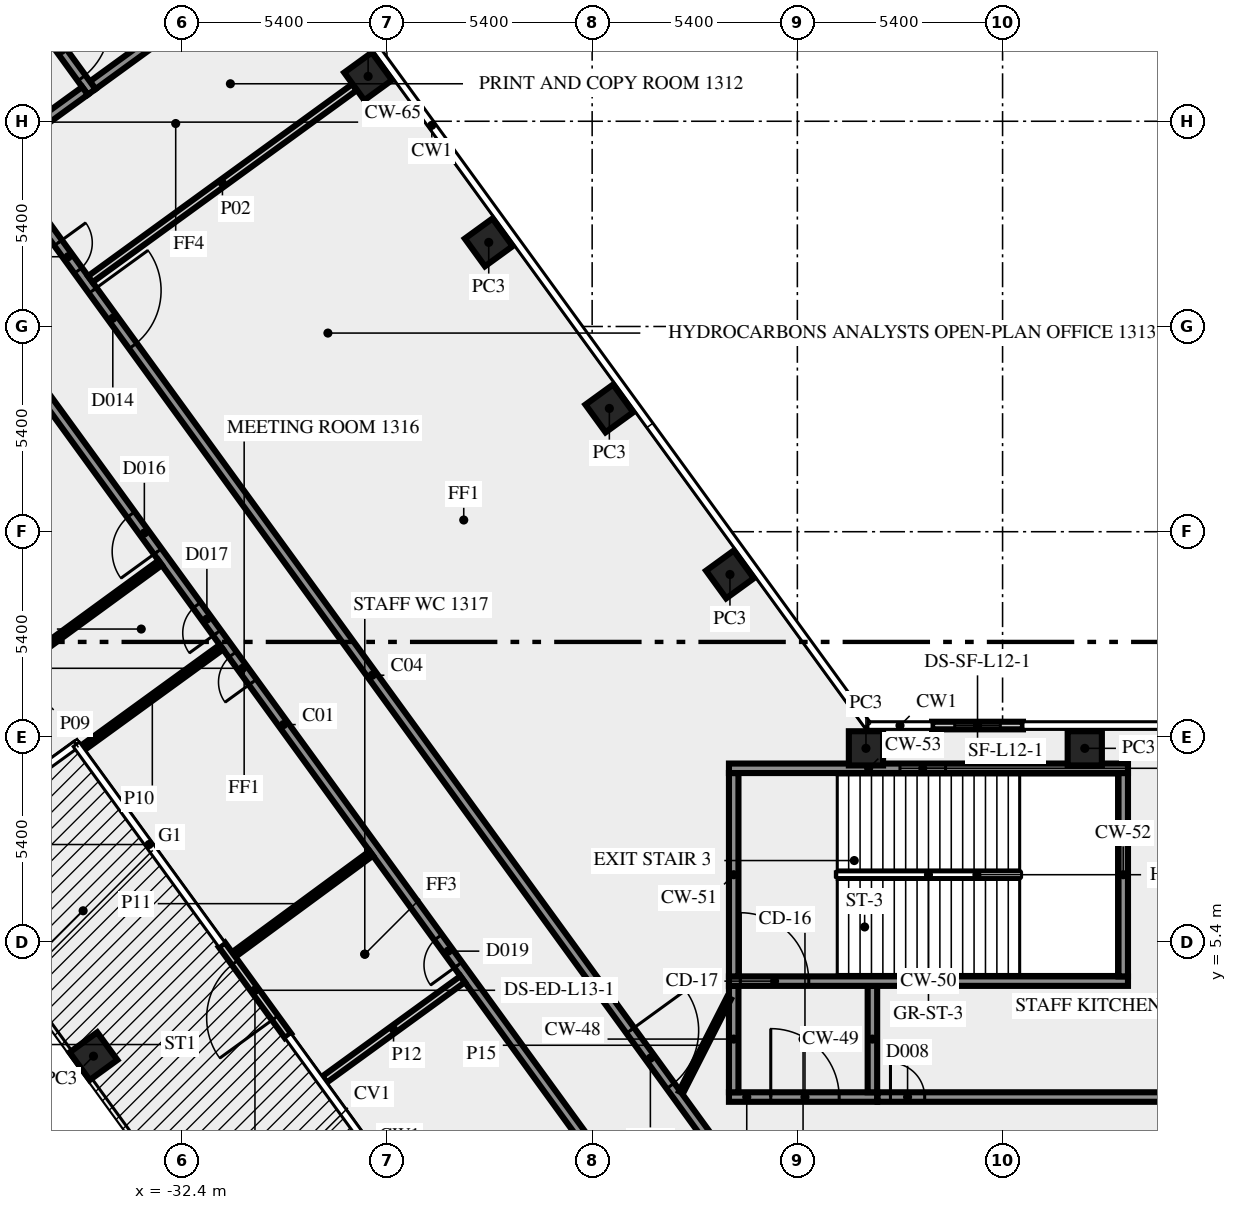
"""IFC4 building model, lengths in metres.
Left out: names, types, materials, properties, quantities, classifications, styles, units other than length and angle.
Written with IfcOpenShell. Run it as: python <this file> out.ifc"""

import sys

from ifc_helpers import new_model, si_unit, direction, frame, frame_2d, origin, origin_2d, place, context, subcontext, project, spatial, rectangle, extrude, element, fill, save


model = new_model("IFC4")
c1 = context("Model", 3, precision=1e-05, world=origin(), true_north=direction((0.0, 1.0)))
c2 = subcontext(c1, "Body", "Model", "MODEL_VIEW")
j1 = project(units=[si_unit("LENGTHUNIT", "METRE"), si_unit("PLANEANGLEUNIT", "RADIAN")], contexts=[c1])
p1 = place(None, origin())
s1 = spatial("IfcSite", under=j1, at=p1, CompositionType="ELEMENT")
p2 = place(p1, origin())
s2 = spatial("IfcBuilding", under=s1, at=p2, CompositionType="ELEMENT")
p3 = place(p2, frame((0.0, 0.0, 59.0)))
s3 = spatial("IfcBuildingStorey", under=s2, at=p3, CompositionType="ELEMENT", Elevation=59.0)
for number, where, z_axis, x_axis in (
    (1, (-17.974, 15.075, 0.0), (0.0, 0.0, 1.0), (-0.588, 0.809, 0.0)),
    (2, (-21.147, 19.444, 0.0), (0.0, 0.0, 1.0), (-0.588, 0.809, 0.0)),
    (3, (-24.321, 23.812, 0.0), (0.0, 0.0, 1.0), (-0.588, 0.809, 0.0)),
    (4, (-27.495, 28.181, 0.0), (0.0, 0.0, 1.0), (-0.588, 0.809, 0.0)),
    (5, (-34.722, 2.4, 0.0), (0.0, 0.0, 1.0), (0.588, -0.809, 0.0)),
    (6, (-8.637, 10.5, 0.0), (0.0, 0.0, 1.0), (-1.0, 0.0, 0.0)),
    (7, (-14.395, 10.5, 0.0), (0.0, 0.0, 1.0), (-1.0, 0.0, 0.0)),
):
    element("IfcColumn", number, at=place(p3, frame(where, z_axis=z_axis, x_axis=x_axis)), inside=s3, PredefinedType="COLUMN", context=c2, shape_type="SweptSolid", body=[
        extrude(rectangle(XDim=0.9, YDim=0.9, at=origin_2d()), origin(), (0.0, 0.0, 1.0), 3.65),
    ])
p4 = place(p3, frame((-29.602, 2.936, 0.0), z_axis=(0.0, 0.0, 1.0), x_axis=(-0.587735577821, 0.809053082661, 0.0)))
e8 = element("IfcWall", 8, at=p4, inside=s3, PredefinedType="SOLIDWALL", context=c2, shape_type="SweptSolid", body=[
    extrude(rectangle(XDim=2.963, YDim=0.2, at=frame_2d((1.481, 0.0))), origin(), (0.0, 0.0, 1.0), 3.65),
])
p5 = place(p4, frame((0.582, 0.0, 0.0)))
e9 = element("IfcOpeningElement", 9, at=p5, cuts=e8, PredefinedType="OPENING", context=c2, shape_type="SweptSolid", body=[
    extrude(rectangle(XDim=1.8, YDim=2.4, at=frame_2d((0.9, 1.2))), frame((0.0, 0.11, 0.0), z_axis=(0.0, -1.0, 0.0), x_axis=(1.0, 0.0, 0.0)), (0.0, 0.0, 1.0), 0.22),
])
p6 = place(p3, frame((-10.263, 11.1, 0.0), z_axis=(0.0, 0.0, 1.0), x_axis=(-1.0, 0.0, 0.0)))
e10 = element("IfcWall", 10, at=p6, inside=s3, PredefinedType="SOLIDWALL", context=c2, shape_type="SweptSolid", body=[
    extrude(rectangle(XDim=2.392, YDim=0.2, at=frame_2d((1.196, 0.0))), origin(), (0.0, 0.0, 1.0), 3.65),
])
p7 = place(p6, frame((0.596, 0.0, 1.0)))
e11 = element("IfcOpeningElement", 11, at=p7, cuts=e10, PredefinedType="OPENING", context=c2, shape_type="SweptSolid", body=[
    extrude(rectangle(XDim=1.2, YDim=1.2, at=frame_2d((0.6, 0.6))), frame((0.0, 0.11, 0.0), z_axis=(0.0, -1.0, 0.0), x_axis=(1.0, 0.0, 0.0)), (0.0, 0.0, 1.0), 0.22),
])
p8 = place(p3, frame((-18.0, 1.325, 0.0), z_axis=(0.0, 0.0, 1.0), x_axis=(1.0, 0.0, 0.0)))
e12 = element("IfcWall", 12, at=p8, inside=s3, PredefinedType="SHEAR", context=c2, shape_type="SweptSolid", body=[
    extrude(rectangle(XDim=3.9, YDim=0.25, at=frame_2d((1.95, 0.0))), origin(), (0.0, 0.0, 1.0), 3.65),
])
p9 = place(p8, frame((1.1, 0.0, 0.0)))
e13 = element("IfcOpeningElement", 13, at=p9, cuts=e12, PredefinedType="OPENING", context=c2, shape_type="SweptSolid", body=[
    extrude(rectangle(XDim=1.8, YDim=2.1, at=frame_2d((0.9, 1.05))), frame((0.0, 0.135, 0.0), z_axis=(0.0, -1.0, 0.0), x_axis=(1.0, 0.0, 0.0)), (0.0, 0.0, 1.0), 0.27),
])
for number, where, z_axis, x_axis in (
    (14, (-17.875, 1.45, 0.0), (0.0, 0.0, 1.0), (0.0, 1.0, 0.0)),
    (15, (-14.225, 1.45, 0.0), (0.0, 0.0, 1.0), (0.0, 1.0, 0.0)),
):
    element("IfcWall", number, at=place(p3, frame(where, z_axis=z_axis, x_axis=x_axis)), inside=s3, PredefinedType="SHEAR", context=c2, shape_type="SweptSolid", body=[
        extrude(rectangle(XDim=2.8, YDim=0.25, at=frame_2d((1.4, 0.0))), origin(), (0.0, 0.0, 1.0), 3.65),
    ])
p10 = place(p3, frame((-18.0, 4.375, 0.0), z_axis=(0.0, 0.0, 1.0), x_axis=(1.0, 0.0, 0.0)))
e16 = element("IfcWall", 16, at=p10, inside=s3, PredefinedType="SHEAR", context=c2, shape_type="SweptSolid", body=[
    extrude(rectangle(XDim=10.5, YDim=0.25, at=frame_2d((5.25, 0.0))), origin(), (0.0, 0.0, 1.0), 3.65),
])
p11 = place(p10, frame((0.3, 0.0, 0.0)))
e17 = element("IfcOpeningElement", 17, at=p11, cuts=e16, PredefinedType="OPENING", context=c2, shape_type="SweptSolid", body=[
    extrude(rectangle(XDim=1.8, YDim=2.1, at=frame_2d((0.9, 1.05))), frame((0.0, 0.135, 0.0), z_axis=(0.0, -1.0, 0.0), x_axis=(1.0, 0.0, 0.0)), (0.0, 0.0, 1.0), 0.27),
])
for number, where, z_axis, x_axis in (
    (18, (-17.875, 4.5, 0.0), (0.0, 0.0, 1.0), (0.0, 1.0, 0.0)),
    (19, (-7.625, 4.5, 0.0), (0.0, 0.0, 1.0), (0.0, 1.0, 0.0)),
):
    element("IfcWall", number, at=place(p3, frame(where, z_axis=z_axis, x_axis=x_axis)), inside=s3, PredefinedType="SHEAR", context=c2, shape_type="SweptSolid", body=[
        extrude(rectangle(XDim=5.35, YDim=0.25, at=frame_2d((2.675, 0.0))), origin(), (0.0, 0.0, 1.0), 3.65),
    ])
p12 = place(p3, frame((-18.0, 9.975, 0.0), z_axis=(0.0, 0.0, 1.0), x_axis=(1.0, 0.0, 0.0)))
e20 = element("IfcWall", 20, at=p12, inside=s3, PredefinedType="SHEAR", context=c2, shape_type="SweptSolid", body=[
    extrude(rectangle(XDim=10.5, YDim=0.25, at=frame_2d((5.25, 0.0))), origin(), (0.0, 0.0, 1.0), 3.65),
])
p13 = place(p12, frame((4.5, 0.0, 1.0)))
e21 = element("IfcOpeningElement", 21, at=p13, cuts=e20, PredefinedType="OPENING", context=c2, shape_type="SweptSolid", body=[
    extrude(rectangle(XDim=1.2, YDim=1.2, at=frame_2d((0.6, 0.6))), frame((0.0, 0.135, 0.0), z_axis=(0.0, -1.0, 0.0), x_axis=(1.0, 0.0, 0.0)), (0.0, 0.0, 1.0), 0.27),
])
p14 = place(p3, frame((-30.414, 31.092, 0.0), z_axis=(0.0, 0.0, 1.0), x_axis=(-0.8089984606, -0.587810760999, 0.0)))
e22 = element("IfcWall", 22, at=p14, inside=s3, PredefinedType="SHEAR", context=c2, shape_type="SweptSolid", body=[
    extrude(rectangle(XDim=5.35, YDim=0.25, at=frame_2d((2.675, 0.0))), origin(), (0.0, 0.0, 1.0), 3.65),
])
p15 = place(p3, frame((-40.942, 36.267, 0.0), z_axis=(0.0, 0.0, 1.0), x_axis=(0.587795589702, -0.809009483706, 0.0)))
e23 = element("IfcWall", 23, at=p15, inside=s3, PredefinedType="SHEAR", context=c2, shape_type="SweptSolid", body=[
    extrude(rectangle(XDim=10.5, YDim=0.25, at=frame_2d((5.25, 0.0))), origin(), (0.0, 0.0, 1.0), 3.65),
])
p16 = place(p15, frame((8.25, 0.0, 0.0)))
e24 = element("IfcOpeningElement", 24, at=p16, cuts=e23, PredefinedType="OPENING", context=c2, shape_type="SweptSolid", body=[
    extrude(rectangle(XDim=1.8, YDim=2.1, at=frame_2d((0.9, 1.05))), frame((0.0, 0.135, 0.0), z_axis=(0.0, -1.0, 0.0), x_axis=(1.0, 0.0, 0.0)), (0.0, 0.0, 1.0), 0.27),
])
p17 = place(p3, frame((-34.945, 27.8, 0.0), z_axis=(0.0, 0.0, 1.0), x_axis=(-0.809041377956, -0.587751689708, 0.0)))
e25 = element("IfcWall", 25, at=p17, inside=s3, PredefinedType="SHEAR", context=c2, shape_type="SweptSolid", body=[
    extrude(rectangle(XDim=2.8, YDim=0.25, at=frame_2d((1.4, 0.0))), origin(), (0.0, 0.0, 1.0), 3.65),
])
p18 = place(p3, frame((-20.531, -1.523, 0.0), z_axis=(0.0, 0.0, 1.0), x_axis=(-0.587784593204, 0.809017473231, 0.0)))
e26 = element("IfcWall", 26, at=p18, inside=s3, PredefinedType="SOLIDWALL", context=c2, shape_type="SweptSolid", body=[
    extrude(rectangle(XDim=44.67, YDim=0.25, at=frame_2d((22.335, 0.0))), origin(), (0.0, 0.0, 1.0), 3.65),
])
p19 = place(p18, frame((43.046, 0.0, 0.0)))
e27 = element("IfcOpeningElement", 27, at=p19, cuts=e26, PredefinedType="OPENING", context=c2, shape_type="SweptSolid", body=[
    extrude(rectangle(XDim=1.2, YDim=2.1, at=frame_2d((0.6, 1.05))), frame((0.0, 0.135, 0.0), z_axis=(0.0, -1.0, 0.0), x_axis=(1.0, 0.0, 0.0)), (0.0, 0.0, 1.0), 0.27),
])
p20 = place(p18, frame((21.266, 0.0, 0.0)))
e28 = element("IfcOpeningElement", 28, at=p20, cuts=e26, PredefinedType="OPENING", context=c2, shape_type="SweptSolid", body=[
    extrude(rectangle(XDim=1.2, YDim=2.1, at=frame_2d((0.6, 1.05))), frame((0.0, 0.135, 0.0), z_axis=(0.0, -1.0, 0.0), x_axis=(1.0, 0.0, 0.0)), (0.0, 0.0, 1.0), 0.27),
])
p21 = place(p18, frame((17.015, 0.0, 0.0)))
e29 = element("IfcOpeningElement", 29, at=p21, cuts=e26, PredefinedType="OPENING", context=c2, shape_type="SweptSolid", body=[
    extrude(rectangle(XDim=0.9, YDim=2.1, at=frame_2d((0.45, 1.05))), frame((0.0, 0.135, 0.0), z_axis=(0.0, -1.0, 0.0), x_axis=(1.0, 0.0, 0.0)), (0.0, 0.0, 1.0), 0.27),
])
p22 = place(p18, frame((0.533, 0.0, 0.0)))
e30 = element("IfcOpeningElement", 30, at=p22, cuts=e26, PredefinedType="OPENING", context=c2, shape_type="SweptSolid", body=[
    extrude(rectangle(XDim=0.9, YDim=2.1, at=frame_2d((0.45, 1.05))), frame((0.0, 0.135, 0.0), z_axis=(0.0, -1.0, 0.0), x_axis=(1.0, 0.0, 0.0)), (0.0, 0.0, 1.0), 0.27),
])
p23 = place(p18, frame((18.616, 0.0, 0.0)))
e31 = element("IfcOpeningElement", 31, at=p23, cuts=e26, PredefinedType="OPENING", context=c2, shape_type="SweptSolid", body=[
    extrude(rectangle(XDim=0.9, YDim=2.1, at=frame_2d((0.45, 1.05))), frame((0.0, 0.135, 0.0), z_axis=(0.0, -1.0, 0.0), x_axis=(1.0, 0.0, 0.0)), (0.0, 0.0, 1.0), 0.27),
])
p24 = place(p18, frame((7.816, 0.0, 0.0)))
e32 = element("IfcOpeningElement", 32, at=p24, cuts=e26, PredefinedType="OPENING", context=c2, shape_type="SweptSolid", body=[
    extrude(rectangle(XDim=0.9, YDim=2.1, at=frame_2d((0.45, 1.05))), frame((0.0, 0.135, 0.0), z_axis=(0.0, -1.0, 0.0), x_axis=(1.0, 0.0, 0.0)), (0.0, 0.0, 1.0), 0.27),
])
p25 = place(p3, frame((-37.232, 25.972, 0.0), z_axis=(0.0, 0.0, 1.0), x_axis=(0.587786323093, -0.809016216391, 0.0)))
e33 = element("IfcWall", 33, at=p25, inside=s3, PredefinedType="SOLIDWALL", context=c2, shape_type="SweptSolid", body=[
    extrude(rectangle(XDim=33.493, YDim=0.25, at=frame_2d((16.747, 0.0))), origin(), (0.0, 0.0, 1.0), 3.65),
])
p26 = place(p25, frame((28.301, 0.0, 0.0)))
e34 = element("IfcOpeningElement", 34, at=p26, cuts=e33, PredefinedType="OPENING", context=c2, shape_type="SweptSolid", body=[
    extrude(rectangle(XDim=1.8, YDim=2.1, at=frame_2d((0.9, 1.05))), frame((0.0, 0.135, 0.0), z_axis=(0.0, -1.0, 0.0), x_axis=(1.0, 0.0, 0.0)), (0.0, 0.0, 1.0), 0.27),
])
p27 = place(p25, frame((4.235, 0.0, 0.0)))
e35 = element("IfcOpeningElement", 35, at=p27, cuts=e33, PredefinedType="OPENING", context=c2, shape_type="SweptSolid", body=[
    extrude(rectangle(XDim=1.8, YDim=2.1, at=frame_2d((0.9, 1.05))), frame((0.0, 0.135, 0.0), z_axis=(0.0, -1.0, 0.0), x_axis=(1.0, 0.0, 0.0)), (0.0, 0.0, 1.0), 0.27),
])
p28 = place(p25, frame((2.685, 0.0, 0.0)))
e36 = element("IfcOpeningElement", 36, at=p28, cuts=e33, PredefinedType="OPENING", context=c2, shape_type="SweptSolid", body=[
    extrude(rectangle(XDim=0.9, YDim=2.1, at=frame_2d((0.45, 1.05))), frame((0.0, 0.135, 0.0), z_axis=(0.0, -1.0, 0.0), x_axis=(1.0, 0.0, 0.0)), (0.0, 0.0, 1.0), 0.27),
])
p29 = place(p3, frame((-14.09, 1.325, 0.0), z_axis=(0.0, 0.0, 1.0), x_axis=(1.0, 0.0, 0.0)))
e37 = element("IfcWall", 37, at=p29, inside=s3, PredefinedType="SOLIDWALL", context=c2, shape_type="SweptSolid", body=[
    extrude(rectangle(XDim=28.18, YDim=0.25, at=frame_2d((14.09, 0.0))), origin(), (0.0, 0.0, 1.0), 3.65),
])
p30 = place(p29, frame((26.94, 0.0, 0.0)))
e38 = element("IfcOpeningElement", 38, at=p30, cuts=e37, PredefinedType="OPENING", context=c2, shape_type="SweptSolid", body=[
    extrude(rectangle(XDim=0.9, YDim=2.1, at=frame_2d((0.45, 1.05))), frame((0.0, 0.135, 0.0), z_axis=(0.0, -1.0, 0.0), x_axis=(1.0, 0.0, 0.0)), (0.0, 0.0, 1.0), 0.27),
])
p31 = place(p29, frame((0.34, 0.0, 0.0)))
e39 = element("IfcOpeningElement", 39, at=p31, cuts=e37, PredefinedType="OPENING", context=c2, shape_type="SweptSolid", body=[
    extrude(rectangle(XDim=0.9, YDim=2.1, at=frame_2d((0.45, 1.05))), frame((0.0, 0.135, 0.0), z_axis=(0.0, -1.0, 0.0), x_axis=(1.0, 0.0, 0.0)), (0.0, 0.0, 1.0), 0.27),
])
p32 = place(p29, frame((14.44, 0.0, 0.0)))
e40 = element("IfcOpeningElement", 40, at=p32, cuts=e37, PredefinedType="OPENING", context=c2, shape_type="SweptSolid", body=[
    extrude(rectangle(XDim=0.9, YDim=2.1, at=frame_2d((0.45, 1.05))), frame((0.0, 0.135, 0.0), z_axis=(0.0, -1.0, 0.0), x_axis=(1.0, 0.0, 0.0)), (0.0, 0.0, 1.0), 0.27),
])
p33 = place(p3, frame((-27.851, 27.897, 0.0), z_axis=(0.0, 0.0, 1.0), x_axis=(-0.809030728677, -0.587766348183, 0.0)))
e41 = element("IfcWall", 41, at=p33, inside=s3, PredefinedType="SOLIDWALL", context=c2, shape_type="SweptSolid", body=[
    extrude(rectangle(XDim=8.596, YDim=0.2, at=frame_2d((4.298, 0.0))), origin(), (0.0, 0.0, 1.0), 3.65),
])
p34 = place(p3, frame((-40.68, 9.75, 0.0), z_axis=(0.0, 0.0, 1.0), x_axis=(0.807645841498, 0.589667868135, 0.0)))
e42 = element("IfcWall", 42, at=p34, inside=s3, PredefinedType="PARTITIONING", context=c2, shape_type="SweptSolid", body=[
    extrude(rectangle(XDim=9.551, YDim=0.15, at=frame_2d((4.775, 0.0))), origin(), (0.0, 0.0, 1.0), 2.75),
])
p35 = place(p3, frame((-31.356, 13.164, 0.0), z_axis=(0.0, 0.0, 1.0), x_axis=(-0.80905553785, -0.587732198092, 0.0)))
e43 = element("IfcWall", 43, at=p35, inside=s3, PredefinedType="PARTITIONING", context=c2, shape_type="SweptSolid", body=[
    extrude(rectangle(XDim=4.493, YDim=0.15, at=frame_2d((2.247, 0.0))), origin(), (0.0, 0.0, 1.0), 3.65),
])
p36 = place(p3, frame((-31.008, 5.091, 0.0), z_axis=(0.0, 0.0, 1.0), x_axis=(0.805604164151, 0.592454159157, 0.0)))
e44 = element("IfcWall", 44, at=p36, inside=s3, PredefinedType="PARTITIONING", context=c2, shape_type="SweptSolid", body=[
    extrude(rectangle(XDim=4.462, YDim=0.15, at=frame_2d((2.231, 0.0))), origin(), (0.0, 0.0, 1.0), 3.65),
])
p37 = place(p3, frame((-25.008, 4.427, 0.0), z_axis=(0.0, 0.0, 1.0), x_axis=(-0.809074306937, -0.58770636023, 0.0)))
e45 = element("IfcWall", 45, at=p37, inside=s3, PredefinedType="SOLIDWALL", context=c2, shape_type="SweptSolid", body=[
    extrude(rectangle(XDim=4.493, YDim=0.2, at=frame_2d((2.247, 0.0))), origin(), (0.0, 0.0, 1.0), 3.65),
])
p38 = place(p3, frame((-19.261, 1.45, 0.0), z_axis=(0.0, 0.0, 1.0), x_axis=(0.453950796792, 0.891026752736, 0.0)))
e46 = element("IfcWall", 46, at=p38, inside=s3, PredefinedType="PARTITIONING", context=c2, shape_type="SweptSolid", body=[
    extrude(rectangle(XDim=2.778, YDim=0.12, at=frame_2d((1.389, 0.0))), origin(), (0.0, 0.0, 1.0), 3.65),
])
p39 = place(p5, origin())
e47 = element("IfcDoor", 47, at=p39, inside=s3, OperationType="DOUBLE_DOOR_SINGLE_SWING", PredefinedType="DOOR", context=c2, shape_type="SweptSolid", body=[
    extrude(rectangle(XDim=1.8, YDim=2.4, at=frame_2d((0.9, 1.2))), frame((0.0, 0.025, 0.0), z_axis=(0.0, -1.0, 0.0), x_axis=(1.0, 0.0, 0.0)), (0.0, 0.0, 1.0), 0.05),
])
fill(e9, e47)
p40 = place(p7, origin())
e48 = element("IfcWindow", 48, at=p40, inside=s3, PartitioningType="SINGLE_PANEL", PredefinedType="WINDOW", context=c2, shape_type="SweptSolid", body=[
    extrude(rectangle(XDim=1.2, YDim=1.2, at=frame_2d((0.6, 0.6))), frame((0.0, 0.03, 0.0), z_axis=(0.0, -1.0, 0.0), x_axis=(1.0, 0.0, 0.0)), (0.0, 0.0, 1.0), 0.06),
])
fill(e11, e48)
p41 = place(p9, origin())
e49 = element("IfcDoor", 49, at=p41, inside=s3, OperationType="DOUBLE_DOOR_SINGLE_SWING", PredefinedType="DOOR", context=c2, shape_type="SweptSolid", body=[
    extrude(rectangle(XDim=1.8, YDim=2.1, at=frame_2d((0.9, 1.05))), frame((0.0, 0.025, 0.0), z_axis=(0.0, -1.0, 0.0), x_axis=(1.0, 0.0, 0.0)), (0.0, 0.0, 1.0), 0.05),
])
fill(e13, e49)
p42 = place(p11, origin())
e50 = element("IfcDoor", 50, at=p42, inside=s3, OperationType="DOUBLE_DOOR_SINGLE_SWING", PredefinedType="DOOR", context=c2, shape_type="SweptSolid", body=[
    extrude(rectangle(XDim=1.8, YDim=2.1, at=frame_2d((0.9, 1.05))), frame((0.0, 0.025, 0.0), z_axis=(0.0, -1.0, 0.0), x_axis=(1.0, 0.0, 0.0)), (0.0, 0.0, 1.0), 0.05),
])
fill(e17, e50)
p43 = place(p13, origin())
e51 = element("IfcWindow", 51, at=p43, inside=s3, PartitioningType="SINGLE_PANEL", PredefinedType="WINDOW", context=c2, shape_type="SweptSolid", body=[
    extrude(rectangle(XDim=1.2, YDim=1.2, at=frame_2d((0.6, 0.6))), frame((0.0, 0.03, 0.0), z_axis=(0.0, -1.0, 0.0), x_axis=(1.0, 0.0, 0.0)), (0.0, 0.0, 1.0), 0.06),
])
fill(e21, e51)
p44 = place(p16, origin())
e52 = element("IfcDoor", 52, at=p44, inside=s3, OperationType="DOUBLE_DOOR_SINGLE_SWING", PredefinedType="DOOR", context=c2, shape_type="SweptSolid", body=[
    extrude(rectangle(XDim=1.8, YDim=2.1, at=frame_2d((0.9, 1.05))), frame((0.0, 0.025, 0.0), z_axis=(0.0, -1.0, 0.0), x_axis=(1.0, 0.0, 0.0)), (0.0, 0.0, 1.0), 0.05),
])
fill(e24, e52)
p45 = place(p26, origin())
e53 = element("IfcDoor", 53, at=p45, inside=s3, OperationType="DOUBLE_DOOR_SINGLE_SWING", PredefinedType="DOOR", context=c2, shape_type="SweptSolid", body=[
    extrude(rectangle(XDim=1.8, YDim=2.1, at=frame_2d((0.9, 1.05))), frame((0.0, 0.025, 0.0), z_axis=(0.0, -1.0, 0.0), x_axis=(1.0, 0.0, 0.0)), (0.0, 0.0, 1.0), 0.05),
])
fill(e34, e53)
p46 = place(p27, origin())
e54 = element("IfcDoor", 54, at=p46, inside=s3, OperationType="DOUBLE_DOOR_SINGLE_SWING", PredefinedType="DOOR", context=c2, shape_type="SweptSolid", body=[
    extrude(rectangle(XDim=1.8, YDim=2.1, at=frame_2d((0.9, 1.05))), frame((0.0, 0.025, 0.0), z_axis=(0.0, -1.0, 0.0), x_axis=(1.0, 0.0, 0.0)), (0.0, 0.0, 1.0), 0.05),
])
fill(e35, e54)
p47 = place(p20, origin())
e55 = element("IfcDoor", 55, at=p47, inside=s3, OperationType="SINGLE_SWING_LEFT", PredefinedType="DOOR", context=c2, shape_type="SweptSolid", body=[
    extrude(rectangle(XDim=1.2, YDim=2.1, at=frame_2d((0.6, 1.05))), frame((0.0, 0.025, 0.0), z_axis=(0.0, -1.0, 0.0), x_axis=(1.0, 0.0, 0.0)), (0.0, 0.0, 1.0), 0.05),
])
fill(e28, e55)
p48 = place(p21, origin())
e56 = element("IfcDoor", 56, at=p48, inside=s3, OperationType="SINGLE_SWING_RIGHT", PredefinedType="DOOR", context=c2, shape_type="SweptSolid", body=[
    extrude(rectangle(XDim=0.9, YDim=2.1, at=frame_2d((0.45, 1.05))), frame((0.0, 0.025, 0.0), z_axis=(0.0, -1.0, 0.0), x_axis=(1.0, 0.0, 0.0)), (0.0, 0.0, 1.0), 0.05),
])
fill(e29, e56)
p49 = place(p28, origin())
e57 = element("IfcDoor", 57, at=p49, inside=s3, OperationType="SINGLE_SWING_RIGHT", PredefinedType="DOOR", context=c2, shape_type="SweptSolid", body=[
    extrude(rectangle(XDim=0.9, YDim=2.1, at=frame_2d((0.45, 1.05))), frame((0.0, 0.025, 0.0), z_axis=(0.0, -1.0, 0.0), x_axis=(1.0, 0.0, 0.0)), (0.0, 0.0, 1.0), 0.05),
])
fill(e36, e57)
p50 = place(p31, origin())
e58 = element("IfcDoor", 58, at=p50, inside=s3, OperationType="SINGLE_SWING_LEFT", PredefinedType="DOOR", context=c2, shape_type="SweptSolid", body=[
    extrude(rectangle(XDim=0.9, YDim=2.1, at=frame_2d((0.45, 1.05))), frame((0.0, 0.025, 0.0), z_axis=(0.0, -1.0, 0.0), x_axis=(1.0, 0.0, 0.0)), (0.0, 0.0, 1.0), 0.05),
])
fill(e39, e58)
p51 = place(p23, origin())
e59 = element("IfcDoor", 59, at=p51, inside=s3, OperationType="SINGLE_SWING_LEFT", PredefinedType="DOOR", context=c2, shape_type="SweptSolid", body=[
    extrude(rectangle(XDim=0.9, YDim=2.1, at=frame_2d((0.45, 1.05))), frame((0.0, 0.025, 0.0), z_axis=(0.0, -1.0, 0.0), x_axis=(1.0, 0.0, 0.0)), (0.0, 0.0, 1.0), 0.05),
])
fill(e31, e59)
p52 = place(p24, origin())
e60 = element("IfcDoor", 60, at=p52, inside=s3, OperationType="SINGLE_SWING_LEFT", PredefinedType="DOOR", context=c2, shape_type="SweptSolid", body=[
    extrude(rectangle(XDim=0.9, YDim=2.1, at=frame_2d((0.45, 1.05))), frame((0.0, 0.025, 0.0), z_axis=(0.0, -1.0, 0.0), x_axis=(1.0, 0.0, 0.0)), (0.0, 0.0, 1.0), 0.05),
])
fill(e32, e60)
save(model, sys.argv[1])
